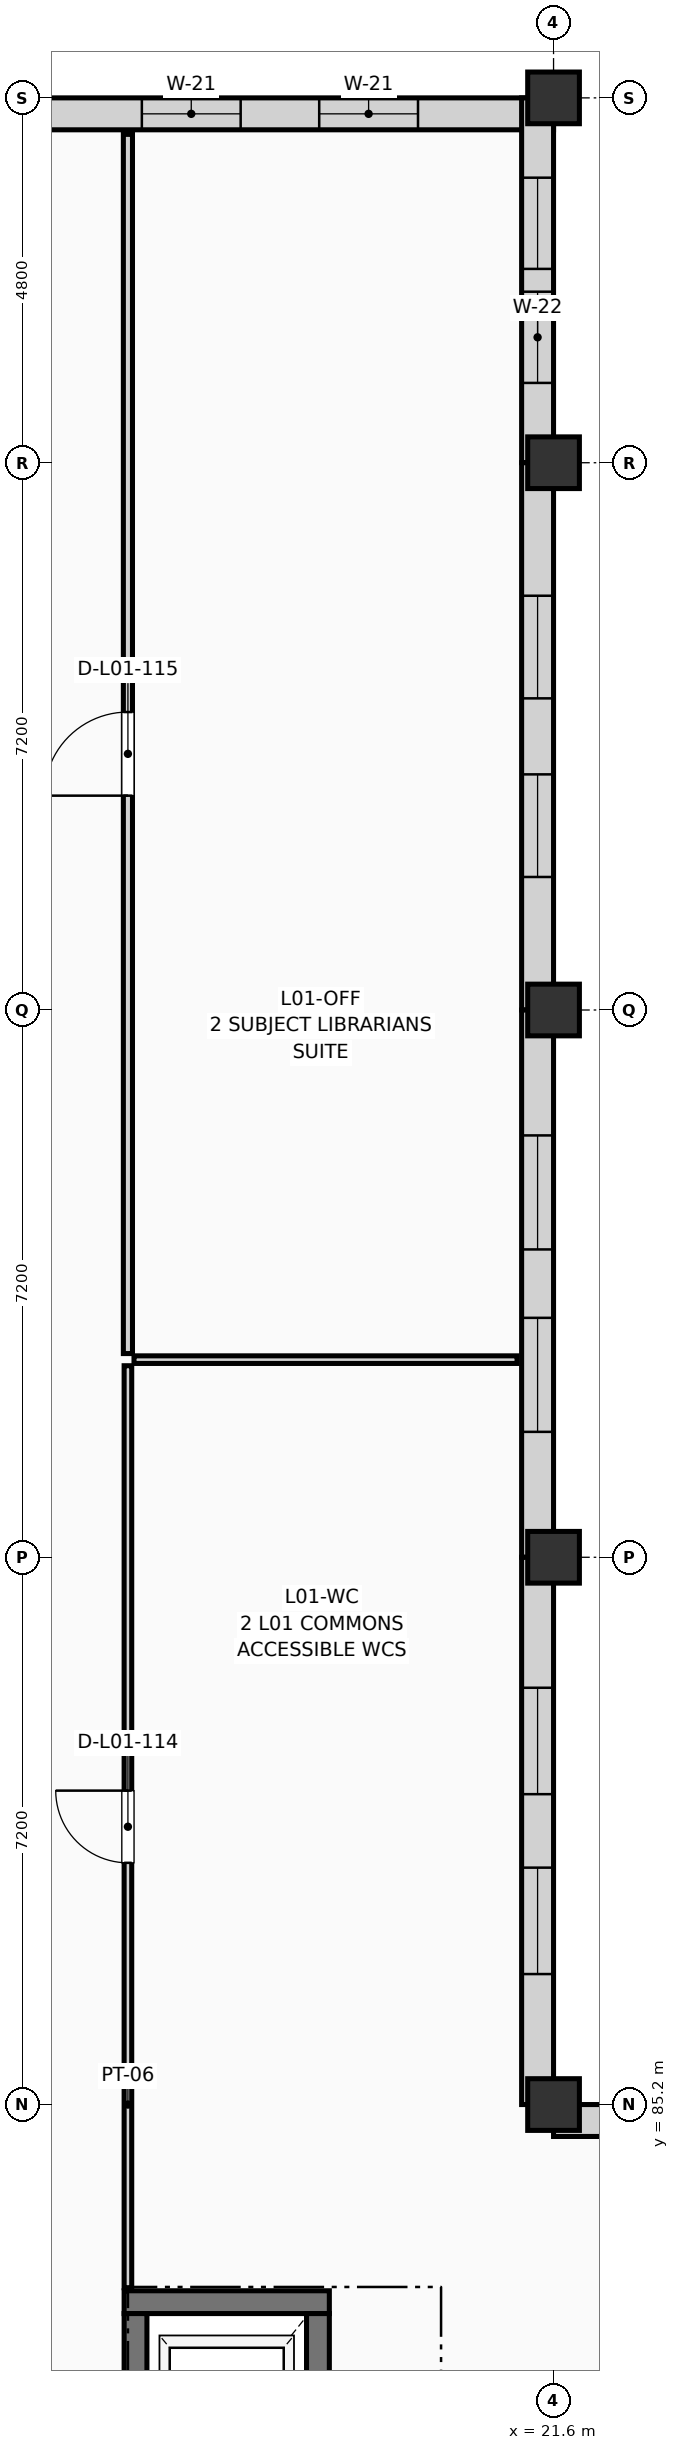
"""IFC4 building model, lengths in metres.
Left out: names, types, materials, properties, quantities, classifications, styles, units other than length and angle.
Written with IfcOpenShell. Run it as: python <this file> out.ifc"""

import sys

from ifc_helpers import new_model, si_unit, direction, frame, frame_2d, origin, origin_2d, place, context, subcontext, project, spatial, rectangle, extrude, element, fill, save


model = new_model("IFC4")
c1 = context("Model", 3, precision=1e-05, world=origin(), true_north=direction((0.0, 1.0)))
c2 = subcontext(c1, "Body", "Model", "MODEL_VIEW")
j1 = project(units=[si_unit("LENGTHUNIT", "METRE"), si_unit("PLANEANGLEUNIT", "RADIAN")], contexts=[c1])
p1 = place(None, origin())
s1 = spatial("IfcSite", under=j1, at=p1, CompositionType="ELEMENT")
p2 = place(p1, origin())
s2 = spatial("IfcBuilding", under=s1, at=p2, CompositionType="ELEMENT")
p3 = place(p2, frame((0.0, 0.0, 4.5)))
s3 = spatial("IfcBuildingStorey", under=s2, at=p3, CompositionType="ELEMENT", Elevation=4.5)
for number, where, z_axis, x_axis in (
    (1, (21.6, 85.2, 0.0), (0.0, 0.0, 1.0), (1.0, 0.0, 0.0)),
    (2, (21.6, 92.4, 0.0), (0.0, 0.0, 1.0), (1.0, 0.0, 0.0)),
    (3, (21.6, 99.6, 0.0), (0.0, 0.0, 1.0), (1.0, 0.0, 0.0)),
    (4, (21.6, 106.8, 0.0), (0.0, 0.0, 1.0), (1.0, 0.0, 0.0)),
    (5, (21.6, 111.6, 0.0), (0.0, 0.0, 1.0), (1.0, 0.0, 0.0)),
):
    element("IfcColumn", number, at=place(p3, frame(where, z_axis=z_axis, x_axis=x_axis)), inside=s3, PredefinedType="COLUMN", context=c2, shape_type="SweptSolid", body=[
        extrude(rectangle(XDim=0.68, YDim=0.68, at=origin_2d()), origin(), (0.0, 0.0, 1.0), 4.05),
    ])
p4 = place(p3, frame((14.4, 111.39, 0.0), z_axis=(0.0, 0.0, 1.0), x_axis=(1.0, 0.0, 0.0)))
e6 = element("IfcWall", 6, at=p4, inside=s3, PredefinedType="SOLIDWALL", context=c2, shape_type="SweptSolid", body=[
    extrude(rectangle(XDim=7.2, YDim=0.42, at=frame_2d((3.6, 0.0))), origin(), (0.0, 0.0, 1.0), 3.16),
])
p5 = place(p4, frame((1.783, 0.0, 0.45)))
e7 = element("IfcOpeningElement", 7, at=p5, cuts=e6, PredefinedType="OPENING", context=c2, shape_type="SweptSolid", body=[
    extrude(rectangle(XDim=1.3, YDim=2.35, at=frame_2d((0.65, 1.175))), frame((0.0, 0.222, 0.0), z_axis=(0.0, -1.0, 0.0), x_axis=(1.0, 0.0, 0.0)), (0.0, 0.0, 1.0), 0.444),
])
p6 = place(p4, frame((4.117, 0.0, 0.45)))
e8 = element("IfcOpeningElement", 8, at=p6, cuts=e6, PredefinedType="OPENING", context=c2, shape_type="SweptSolid", body=[
    extrude(rectangle(XDim=1.3, YDim=2.35, at=frame_2d((0.65, 1.175))), frame((0.0, 0.222, 0.0), z_axis=(0.0, -1.0, 0.0), x_axis=(1.0, 0.0, 0.0)), (0.0, 0.0, 1.0), 0.444),
])
p7 = place(p3, frame((21.39, 106.8, 0.0), z_axis=(0.0, 0.0, 1.0), x_axis=(0.0, 1.0, 0.0)))
e9 = element("IfcWall", 9, at=p7, inside=s3, PredefinedType="SOLIDWALL", context=c2, shape_type="SweptSolid", body=[
    extrude(rectangle(XDim=4.8, YDim=0.42, at=frame_2d((2.4, 0.0))), origin(), (0.0, 0.0, 1.0), 3.16),
])
p8 = place(p7, frame((1.05, 0.0, 0.45)))
e10 = element("IfcOpeningElement", 10, at=p8, cuts=e9, PredefinedType="OPENING", context=c2, shape_type="SweptSolid", body=[
    extrude(rectangle(XDim=1.2, YDim=2.35, at=frame_2d((0.6, 1.175))), frame((0.0, 0.222, 0.0), z_axis=(0.0, -1.0, 0.0), x_axis=(1.0, 0.0, 0.0)), (0.0, 0.0, 1.0), 0.444),
])
p9 = place(p7, frame((2.55, 0.0, 0.45)))
e11 = element("IfcOpeningElement", 11, at=p9, cuts=e9, PredefinedType="OPENING", context=c2, shape_type="SweptSolid", body=[
    extrude(rectangle(XDim=1.2, YDim=2.35, at=frame_2d((0.6, 1.175))), frame((0.0, 0.222, 0.0), z_axis=(0.0, -1.0, 0.0), x_axis=(1.0, 0.0, 0.0)), (0.0, 0.0, 1.0), 0.444),
])
p10 = place(p3, frame((21.39, 99.6, 0.0), z_axis=(0.0, 0.0, 1.0), x_axis=(0.0, 1.0, 0.0)))
e12 = element("IfcWall", 12, at=p10, inside=s3, PredefinedType="SOLIDWALL", context=c2, shape_type="SweptSolid", body=[
    extrude(rectangle(XDim=7.2, YDim=0.42, at=frame_2d((3.6, 0.0))), origin(), (0.0, 0.0, 1.0), 3.16),
])
p11 = place(p10, frame((1.75, 0.0, 0.45)))
e13 = element("IfcOpeningElement", 13, at=p11, cuts=e12, PredefinedType="OPENING", context=c2, shape_type="SweptSolid", body=[
    extrude(rectangle(XDim=1.35, YDim=2.45, at=frame_2d((0.675, 1.225))), frame((0.0, 0.222, 0.0), z_axis=(0.0, -1.0, 0.0), x_axis=(1.0, 0.0, 0.0)), (0.0, 0.0, 1.0), 0.444),
])
p12 = place(p10, frame((4.1, 0.0, 0.45)))
e14 = element("IfcOpeningElement", 14, at=p12, cuts=e12, PredefinedType="OPENING", context=c2, shape_type="SweptSolid", body=[
    extrude(rectangle(XDim=1.35, YDim=2.45, at=frame_2d((0.675, 1.225))), frame((0.0, 0.222, 0.0), z_axis=(0.0, -1.0, 0.0), x_axis=(1.0, 0.0, 0.0)), (0.0, 0.0, 1.0), 0.444),
])
p13 = place(p3, frame((21.39, 92.4, 0.0), z_axis=(0.0, 0.0, 1.0), x_axis=(0.0, 1.0, 0.0)))
e15 = element("IfcWall", 15, at=p13, inside=s3, PredefinedType="SOLIDWALL", context=c2, shape_type="SweptSolid", body=[
    extrude(rectangle(XDim=7.2, YDim=0.42, at=frame_2d((3.6, 0.0))), origin(), (0.0, 0.0, 1.0), 3.16),
])
p14 = place(p13, frame((1.65, 0.0, 0.45)))
e16 = element("IfcOpeningElement", 16, at=p14, cuts=e15, PredefinedType="OPENING", context=c2, shape_type="SweptSolid", body=[
    extrude(rectangle(XDim=1.5, YDim=2.4, at=frame_2d((0.75, 1.2))), frame((0.0, 0.222, 0.0), z_axis=(0.0, -1.0, 0.0), x_axis=(1.0, 0.0, 0.0)), (0.0, 0.0, 1.0), 0.444),
])
p15 = place(p13, frame((4.05, 0.0, 0.45)))
e17 = element("IfcOpeningElement", 17, at=p15, cuts=e15, PredefinedType="OPENING", context=c2, shape_type="SweptSolid", body=[
    extrude(rectangle(XDim=1.5, YDim=2.4, at=frame_2d((0.75, 1.2))), frame((0.0, 0.222, 0.0), z_axis=(0.0, -1.0, 0.0), x_axis=(1.0, 0.0, 0.0)), (0.0, 0.0, 1.0), 0.444),
])
p16 = place(p3, frame((21.39, 85.2, 0.0), z_axis=(0.0, 0.0, 1.0), x_axis=(0.0, 1.0, 0.0)))
e18 = element("IfcWall", 18, at=p16, inside=s3, PredefinedType="SOLIDWALL", context=c2, shape_type="SweptSolid", body=[
    extrude(rectangle(XDim=7.2, YDim=0.42, at=frame_2d((3.6, 0.0))), origin(), (0.0, 0.0, 1.0), 3.16),
])
p17 = place(p16, frame((1.717, 0.0, 0.45)))
e19 = element("IfcOpeningElement", 19, at=p17, cuts=e18, PredefinedType="OPENING", context=c2, shape_type="SweptSolid", body=[
    extrude(rectangle(XDim=1.4, YDim=2.38, at=frame_2d((0.7, 1.19))), frame((0.0, 0.222, 0.0), z_axis=(0.0, -1.0, 0.0), x_axis=(1.0, 0.0, 0.0)), (0.0, 0.0, 1.0), 0.444),
])
p18 = place(p16, frame((4.083, 0.0, 0.45)))
e20 = element("IfcOpeningElement", 20, at=p18, cuts=e18, PredefinedType="OPENING", context=c2, shape_type="SweptSolid", body=[
    extrude(rectangle(XDim=1.4, YDim=2.38, at=frame_2d((0.7, 1.19))), frame((0.0, 0.222, 0.0), z_axis=(0.0, -1.0, 0.0), x_axis=(1.0, 0.0, 0.0)), (0.0, 0.0, 1.0), 0.444),
])
p19 = place(p3, frame((21.6, 84.99, 0.0), z_axis=(0.0, 0.0, 1.0), x_axis=(1.0, 0.0, 0.0)))
e21 = element("IfcWall", 21, at=p19, inside=s3, PredefinedType="SOLIDWALL", context=c2, shape_type="SweptSolid", body=[
    extrude(rectangle(XDim=7.2, YDim=0.42, at=frame_2d((3.6, 0.0))), origin(), (0.0, 0.0, 1.0), 3.16),
])
p20 = place(p19, frame((1.783, 0.0, 0.45)))
e22 = element("IfcOpeningElement", 22, at=p20, cuts=e21, PredefinedType="OPENING", context=c2, shape_type="SweptSolid", body=[
    extrude(rectangle(XDim=1.3, YDim=2.35, at=frame_2d((0.65, 1.175))), frame((0.0, 0.222, 0.0), z_axis=(0.0, -1.0, 0.0), x_axis=(1.0, 0.0, 0.0)), (0.0, 0.0, 1.0), 0.444),
])
p21 = place(p19, frame((4.117, 0.0, 0.45)))
e23 = element("IfcOpeningElement", 23, at=p21, cuts=e21, PredefinedType="OPENING", context=c2, shape_type="SweptSolid", body=[
    extrude(rectangle(XDim=1.3, YDim=2.35, at=frame_2d((0.65, 1.175))), frame((0.0, 0.222, 0.0), z_axis=(0.0, -1.0, 0.0), x_axis=(1.0, 0.0, 0.0)), (0.0, 0.0, 1.0), 0.444),
])
p22 = place(p3, frame((15.95, 82.6, 0.0), z_axis=(0.0, 0.0, 1.0), x_axis=(1.0, 0.0, 0.0)))
e24 = element("IfcWall", 24, at=p22, inside=s3, PredefinedType="SHEAR", context=c2, shape_type="SweptSolid", body=[
    extrude(rectangle(XDim=2.7, YDim=0.3, at=frame_2d((1.35, 0.0))), origin(), (0.0, 0.0, 1.0), 3.79),
])
p23 = place(p3, frame((16.1, 79.78, 0.0), z_axis=(0.0, 0.0, 1.0), x_axis=(0.0, 1.0, 0.0)))
e25 = element("IfcWall", 25, at=p23, inside=s3, PredefinedType="SHEAR", context=c2, shape_type="SweptSolid", body=[
    extrude(rectangle(XDim=2.67, YDim=0.3, at=frame_2d((1.335, 0.0))), origin(), (0.0, 0.0, 1.0), 3.79),
])
p24 = place(p23, frame((0.785, 0.0, 0.0)))
e26 = element("IfcOpeningElement", 26, at=p24, cuts=e25, PredefinedType="OPENING", context=c2, shape_type="SweptSolid", body=[
    extrude(rectangle(XDim=1.1, YDim=2.2, at=frame_2d((0.55, 1.1))), frame((0.0, 0.162, 0.0), z_axis=(0.0, -1.0, 0.0), x_axis=(1.0, 0.0, 0.0)), (0.0, 0.0, 1.0), 0.324),
])
p25 = place(p3, frame((18.5, 79.78, 0.0), z_axis=(0.0, 0.0, 1.0), x_axis=(0.0, 1.0, 0.0)))
e27 = element("IfcWall", 27, at=p25, inside=s3, PredefinedType="SHEAR", context=c2, shape_type="SweptSolid", body=[
    extrude(rectangle(XDim=2.67, YDim=0.3, at=frame_2d((1.335, 0.0))), origin(), (0.0, 0.0, 1.0), 3.79),
])
p26 = place(p3, frame((16.0, 82.79, 0.0), z_axis=(0.0, 0.0, 1.0), x_axis=(0.0, 1.0, 0.0)))
e28 = element("IfcWall", 28, at=p26, inside=s3, PredefinedType="PARTITIONING", context=c2, shape_type="SweptSolid", body=[
    extrude(rectangle(XDim=12.13, YDim=0.1, at=frame_2d((6.065, 0.0))), origin(), (0.0, 0.0, 1.0), 3.775),
])
p27 = place(p26, frame((5.59, 0.0, 0.0)))
e29 = element("IfcOpeningElement", 29, at=p27, cuts=e28, PredefinedType="OPENING", context=c2, shape_type="SweptSolid", body=[
    extrude(rectangle(XDim=0.95, YDim=2.1, at=frame_2d((0.475, 1.05))), frame((0.0, 0.062, 0.0), z_axis=(0.0, -1.0, 0.0), x_axis=(1.0, 0.0, 0.0)), (0.0, 0.0, 1.0), 0.124),
])
p28 = place(p3, frame((16.08, 95.0, 0.0), z_axis=(0.0, 0.0, 1.0), x_axis=(1.0, 0.0, 0.0)))
e30 = element("IfcWall", 30, at=p28, inside=s3, PredefinedType="PARTITIONING", context=c2, shape_type="SweptSolid", body=[
    extrude(rectangle(XDim=5.04, YDim=0.1, at=frame_2d((2.52, 0.0))), origin(), (0.0, 0.0, 1.0), 3.775),
])
p29 = place(p3, frame((16.0, 95.08, 0.0), z_axis=(0.0, 0.0, 1.0), x_axis=(0.0, 1.0, 0.0)))
e31 = element("IfcWall", 31, at=p29, inside=s3, PredefinedType="PARTITIONING", context=c2, shape_type="SweptSolid", body=[
    extrude(rectangle(XDim=16.04, YDim=0.12, at=frame_2d((8.02, 0.0))), origin(), (0.0, 0.0, 1.0), 3.775),
])
p30 = place(p29, frame((7.34, 0.0, 0.0)))
e32 = element("IfcOpeningElement", 32, at=p30, cuts=e31, PredefinedType="OPENING", context=c2, shape_type="SweptSolid", body=[
    extrude(rectangle(XDim=1.1, YDim=2.15, at=frame_2d((0.55, 1.075))), frame((0.0, 0.072, 0.0), z_axis=(0.0, -1.0, 0.0), x_axis=(1.0, 0.0, 0.0)), (0.0, 0.0, 1.0), 0.144),
])
p31 = place(p5, origin())
e33 = element("IfcWindow", 33, at=p31, inside=s3, PartitioningType="SINGLE_PANEL", PredefinedType="WINDOW", context=c2, shape_type="SweptSolid", body=[
    extrude(rectangle(XDim=1.3, YDim=2.35, at=frame_2d((0.65, 1.175))), frame((0.0, 0.03, 0.0), z_axis=(0.0, -1.0, 0.0), x_axis=(1.0, 0.0, 0.0)), (0.0, 0.0, 1.0), 0.06),
])
fill(e7, e33)
p32 = place(p6, origin())
e34 = element("IfcWindow", 34, at=p32, inside=s3, PartitioningType="SINGLE_PANEL", PredefinedType="WINDOW", context=c2, shape_type="SweptSolid", body=[
    extrude(rectangle(XDim=1.3, YDim=2.35, at=frame_2d((0.65, 1.175))), frame((0.0, 0.03, 0.0), z_axis=(0.0, -1.0, 0.0), x_axis=(1.0, 0.0, 0.0)), (0.0, 0.0, 1.0), 0.06),
])
fill(e8, e34)
p33 = place(p8, origin())
e35 = element("IfcWindow", 35, at=p33, inside=s3, PartitioningType="SINGLE_PANEL", PredefinedType="WINDOW", context=c2, shape_type="SweptSolid", body=[
    extrude(rectangle(XDim=1.2, YDim=2.35, at=frame_2d((0.6, 1.175))), frame((0.0, 0.03, 0.0), z_axis=(0.0, -1.0, 0.0), x_axis=(1.0, 0.0, 0.0)), (0.0, 0.0, 1.0), 0.06),
])
fill(e10, e35)
p34 = place(p9, origin())
e36 = element("IfcWindow", 36, at=p34, inside=s3, PartitioningType="SINGLE_PANEL", PredefinedType="WINDOW", context=c2, shape_type="SweptSolid", body=[
    extrude(rectangle(XDim=1.2, YDim=2.35, at=frame_2d((0.6, 1.175))), frame((0.0, 0.03, 0.0), z_axis=(0.0, -1.0, 0.0), x_axis=(1.0, 0.0, 0.0)), (0.0, 0.0, 1.0), 0.06),
])
fill(e11, e36)
p35 = place(p11, origin())
e37 = element("IfcWindow", 37, at=p35, inside=s3, PartitioningType="SINGLE_PANEL", PredefinedType="WINDOW", context=c2, shape_type="SweptSolid", body=[
    extrude(rectangle(XDim=1.35, YDim=2.45, at=frame_2d((0.675, 1.225))), frame((0.0, 0.03, 0.0), z_axis=(0.0, -1.0, 0.0), x_axis=(1.0, 0.0, 0.0)), (0.0, 0.0, 1.0), 0.06),
])
fill(e13, e37)
p36 = place(p12, origin())
e38 = element("IfcWindow", 38, at=p36, inside=s3, PartitioningType="SINGLE_PANEL", PredefinedType="WINDOW", context=c2, shape_type="SweptSolid", body=[
    extrude(rectangle(XDim=1.35, YDim=2.45, at=frame_2d((0.675, 1.225))), frame((0.0, 0.03, 0.0), z_axis=(0.0, -1.0, 0.0), x_axis=(1.0, 0.0, 0.0)), (0.0, 0.0, 1.0), 0.06),
])
fill(e14, e38)
p37 = place(p14, origin())
e39 = element("IfcWindow", 39, at=p37, inside=s3, PartitioningType="SINGLE_PANEL", PredefinedType="WINDOW", context=c2, shape_type="SweptSolid", body=[
    extrude(rectangle(XDim=1.5, YDim=2.4, at=frame_2d((0.75, 1.2))), frame((0.0, 0.03, 0.0), z_axis=(0.0, -1.0, 0.0), x_axis=(1.0, 0.0, 0.0)), (0.0, 0.0, 1.0), 0.06),
])
fill(e16, e39)
p38 = place(p15, origin())
e40 = element("IfcWindow", 40, at=p38, inside=s3, PartitioningType="SINGLE_PANEL", PredefinedType="WINDOW", context=c2, shape_type="SweptSolid", body=[
    extrude(rectangle(XDim=1.5, YDim=2.4, at=frame_2d((0.75, 1.2))), frame((0.0, 0.03, 0.0), z_axis=(0.0, -1.0, 0.0), x_axis=(1.0, 0.0, 0.0)), (0.0, 0.0, 1.0), 0.06),
])
fill(e17, e40)
p39 = place(p17, origin())
e41 = element("IfcWindow", 41, at=p39, inside=s3, PartitioningType="SINGLE_PANEL", PredefinedType="WINDOW", context=c2, shape_type="SweptSolid", body=[
    extrude(rectangle(XDim=1.4, YDim=2.38, at=frame_2d((0.7, 1.19))), frame((0.0, 0.03, 0.0), z_axis=(0.0, -1.0, 0.0), x_axis=(1.0, 0.0, 0.0)), (0.0, 0.0, 1.0), 0.06),
])
fill(e19, e41)
p40 = place(p18, origin())
e42 = element("IfcWindow", 42, at=p40, inside=s3, PartitioningType="SINGLE_PANEL", PredefinedType="WINDOW", context=c2, shape_type="SweptSolid", body=[
    extrude(rectangle(XDim=1.4, YDim=2.38, at=frame_2d((0.7, 1.19))), frame((0.0, 0.03, 0.0), z_axis=(0.0, -1.0, 0.0), x_axis=(1.0, 0.0, 0.0)), (0.0, 0.0, 1.0), 0.06),
])
fill(e20, e42)
p41 = place(p27, origin())
e43 = element("IfcDoor", 43, at=p41, inside=s3, OperationType="SINGLE_SWING_RIGHT", PredefinedType="DOOR", context=c2, shape_type="SweptSolid", body=[
    extrude(rectangle(XDim=0.95, YDim=2.1, at=frame_2d((0.475, 1.05))), frame((0.0, 0.025, 0.0), z_axis=(0.0, -1.0, 0.0), x_axis=(1.0, 0.0, 0.0)), (0.0, 0.0, 1.0), 0.05),
])
fill(e29, e43)
p42 = place(p30, origin())
e44 = element("IfcDoor", 44, at=p42, inside=s3, OperationType="SINGLE_SWING_LEFT", PredefinedType="DOOR", context=c2, shape_type="SweptSolid", body=[
    extrude(rectangle(XDim=1.1, YDim=2.15, at=frame_2d((0.55, 1.075))), frame((0.0, 0.025, 0.0), z_axis=(0.0, -1.0, 0.0), x_axis=(1.0, 0.0, 0.0)), (0.0, 0.0, 1.0), 0.05),
])
fill(e32, e44)
save(model, sys.argv[1])
